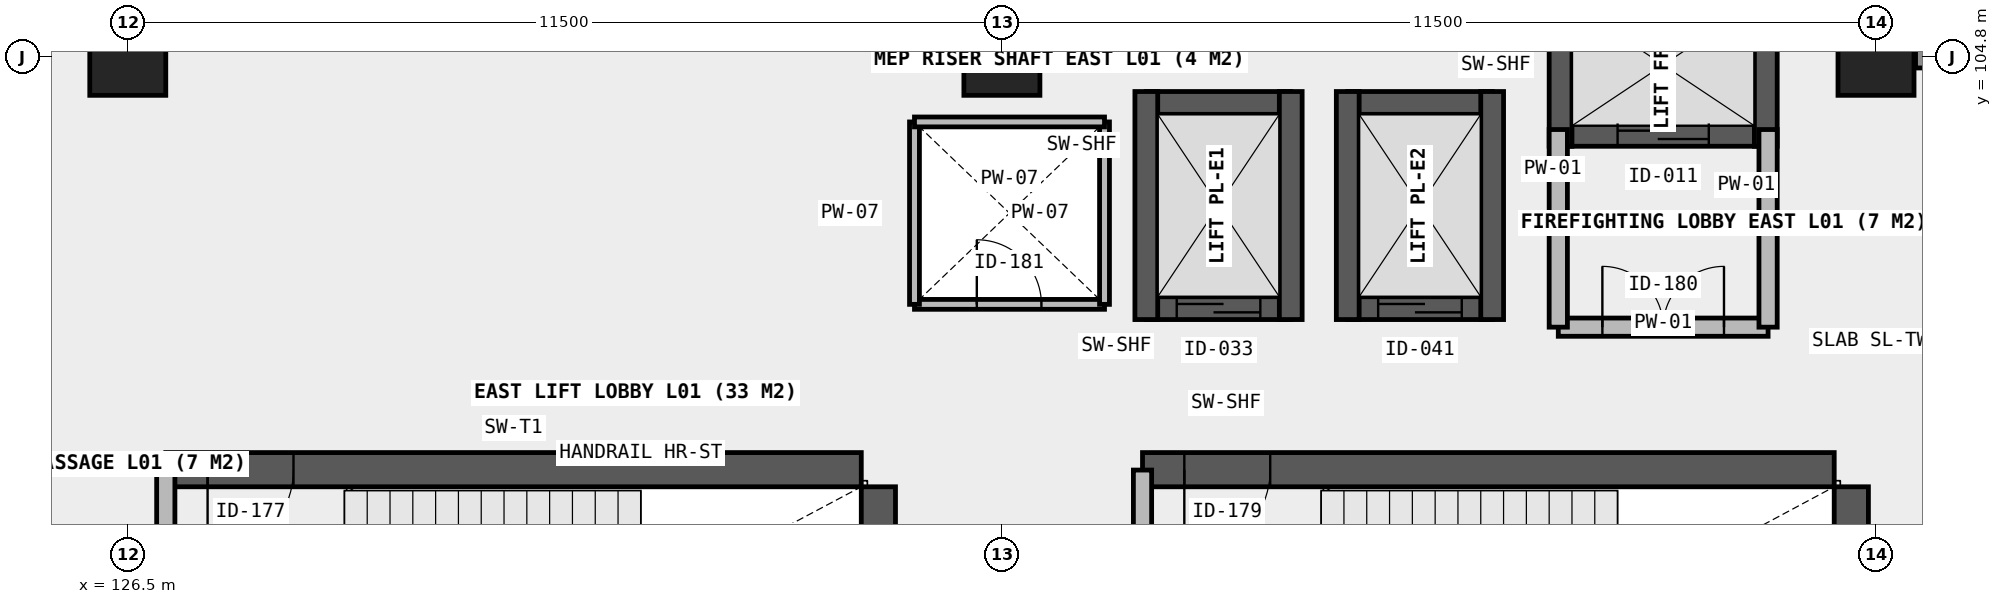
"""IFC4 building model, lengths in metres.
Left out: names, types, materials, properties, quantities, classifications, styles, units other than length and angle.
Written with IfcOpenShell. Run it as: python <this file> out.ifc"""

import sys

from ifc_helpers import new_model, si_unit, direction, frame, frame_2d, origin, origin_2d, place, context, subcontext, project, spatial, rectangle, extrude, element, fill, save


model = new_model("IFC4")
c1 = context("Model", 3, precision=1e-05, world=origin(), true_north=direction((0.0, 1.0)))
c2 = subcontext(c1, "Body", "Model", "MODEL_VIEW")
j1 = project(units=[si_unit("LENGTHUNIT", "METRE"), si_unit("PLANEANGLEUNIT", "RADIAN")], contexts=[c1])
p1 = place(None, origin())
s1 = spatial("IfcSite", under=j1, at=p1, CompositionType="ELEMENT")
p2 = place(p1, origin())
s2 = spatial("IfcBuilding", under=s1, at=p2, CompositionType="ELEMENT")
p3 = place(p2, frame((0.0, 0.0, 4.2)))
s3 = spatial("IfcBuildingStorey", under=s2, at=p3, CompositionType="ELEMENT", Elevation=4.2)
for number, where, z_axis, x_axis in (
    (1, (126.5, 104.8, 0.0), (0.0, 0.0, 1.0), (1.0, 0.0, 0.0)),
    (2, (138.0, 104.8, 0.0), (0.0, 0.0, 1.0), (1.0, 0.0, 0.0)),
    (3, (149.5, 104.8, 0.0), (0.0, 0.0, 1.0), (1.0, 0.0, 0.0)),
):
    element("IfcColumn", number, at=place(p3, frame(where, z_axis=z_axis, x_axis=x_axis)), inside=s3, PredefinedType="COLUMN", context=c2, shape_type="SweptSolid", body=[
        extrude(rectangle(XDim=1.0, YDim=1.0, at=origin_2d()), origin(), (0.0, 0.0, 1.0), 4.2),
    ])
p4 = place(p3, frame((145.35, 103.78, 0.0), z_axis=(0.0, 0.0, 1.0), x_axis=(1.0, 0.0, 0.0)))
e4 = element("IfcWall", 4, at=p4, inside=s3, PredefinedType="SHEAR", context=c2, shape_type="SweptSolid", body=[
    extrude(rectangle(XDim=2.7, YDim=0.3, at=frame_2d((1.35, 0.0))), origin(), (0.0, 0.0, 1.0), 4.2),
])
p5 = place(p4, frame((0.75, 0.0, 0.0)))
e5 = element("IfcOpeningElement", 5, at=p5, cuts=e4, PredefinedType="OPENING", context=c2, shape_type="SweptSolid", body=[
    extrude(rectangle(XDim=1.2, YDim=2.15, at=frame_2d((0.6, 1.075))), frame((0.0, 0.16, 0.0), z_axis=(0.0, -1.0, 0.0), x_axis=(1.0, 0.0, 0.0)), (0.0, 0.0, 1.0), 0.32),
])
for number, where, z_axis, x_axis in (
    (6, (145.35, 103.63, 0.0), (0.0, 0.0, 1.0), (0.0, 1.0, 0.0)),
    (7, (148.05, 103.63, 0.0), (0.0, 0.0, 1.0), (0.0, 1.0, 0.0)),
):
    element("IfcWall", number, at=place(p3, frame(where, z_axis=z_axis, x_axis=x_axis)), inside=s3, PredefinedType="SHEAR", context=c2, shape_type="SweptSolid", body=[
        extrude(rectangle(XDim=2.14, YDim=0.3, at=frame_2d((1.07, 0.0))), origin(), (0.0, 0.0, 1.0), 4.2),
    ])
p6 = place(p3, frame((139.9, 101.5, 0.0), z_axis=(0.0, 0.0, 1.0), x_axis=(1.0, 0.0, 0.0)))
e8 = element("IfcWall", 8, at=p6, inside=s3, PredefinedType="SHEAR", context=c2, shape_type="SweptSolid", body=[
    extrude(rectangle(XDim=1.9, YDim=0.3, at=frame_2d((0.95, 0.0))), origin(), (0.0, 0.0, 1.0), 4.2),
])
p7 = place(p6, frame((0.4, 0.0, 0.0)))
e9 = element("IfcOpeningElement", 9, at=p7, cuts=e8, PredefinedType="OPENING", context=c2, shape_type="SweptSolid", body=[
    extrude(rectangle(XDim=1.1, YDim=2.15, at=frame_2d((0.55, 1.075))), frame((0.0, 0.16, 0.0), z_axis=(0.0, -1.0, 0.0), x_axis=(1.0, 0.0, 0.0)), (0.0, 0.0, 1.0), 0.32),
])
p8 = place(p3, frame((139.9, 104.2, 0.0), z_axis=(0.0, 0.0, 1.0), x_axis=(1.0, 0.0, 0.0)))
e10 = element("IfcWall", 10, at=p8, inside=s3, PredefinedType="SHEAR", context=c2, shape_type="SweptSolid", body=[
    extrude(rectangle(XDim=1.9, YDim=0.3, at=frame_2d((0.95, 0.0))), origin(), (0.0, 0.0, 1.0), 4.2),
])
for number, where, z_axis, x_axis in (
    (11, (139.9, 101.35, 0.0), (0.0, 0.0, 1.0), (0.0, 1.0, 0.0)),
    (12, (141.8, 101.35, 0.0), (0.0, 0.0, 1.0), (0.0, 1.0, 0.0)),
):
    element("IfcWall", number, at=place(p3, frame(where, z_axis=z_axis, x_axis=x_axis)), inside=s3, PredefinedType="SHEAR", context=c2, shape_type="SweptSolid", body=[
        extrude(rectangle(XDim=3.0, YDim=0.3, at=frame_2d((1.5, 0.0))), origin(), (0.0, 0.0, 1.0), 4.2),
    ])
p9 = place(p3, frame((142.55, 101.5, 0.0), z_axis=(0.0, 0.0, 1.0), x_axis=(1.0, 0.0, 0.0)))
e13 = element("IfcWall", 13, at=p9, inside=s3, PredefinedType="SHEAR", context=c2, shape_type="SweptSolid", body=[
    extrude(rectangle(XDim=1.9, YDim=0.3, at=frame_2d((0.95, 0.0))), origin(), (0.0, 0.0, 1.0), 4.2),
])
p10 = place(p9, frame((0.4, 0.0, 0.0)))
e14 = element("IfcOpeningElement", 14, at=p10, cuts=e13, PredefinedType="OPENING", context=c2, shape_type="SweptSolid", body=[
    extrude(rectangle(XDim=1.1, YDim=2.15, at=frame_2d((0.55, 1.075))), frame((0.0, 0.16, 0.0), z_axis=(0.0, -1.0, 0.0), x_axis=(1.0, 0.0, 0.0)), (0.0, 0.0, 1.0), 0.32),
])
p11 = place(p3, frame((142.55, 104.2, 0.0), z_axis=(0.0, 0.0, 1.0), x_axis=(1.0, 0.0, 0.0)))
e15 = element("IfcWall", 15, at=p11, inside=s3, PredefinedType="SHEAR", context=c2, shape_type="SweptSolid", body=[
    extrude(rectangle(XDim=1.9, YDim=0.3, at=frame_2d((0.95, 0.0))), origin(), (0.0, 0.0, 1.0), 4.2),
])
for number, where, z_axis, x_axis in (
    (16, (142.55, 101.35, 0.0), (0.0, 0.0, 1.0), (0.0, 1.0, 0.0)),
    (17, (144.45, 101.35, 0.0), (0.0, 0.0, 1.0), (0.0, 1.0, 0.0)),
):
    element("IfcWall", number, at=place(p3, frame(where, z_axis=z_axis, x_axis=x_axis)), inside=s3, PredefinedType="SHEAR", context=c2, shape_type="SweptSolid", body=[
        extrude(rectangle(XDim=3.0, YDim=0.3, at=frame_2d((1.5, 0.0))), origin(), (0.0, 0.0, 1.0), 4.2),
    ])
p12 = place(p3, frame((127.0, 99.375, 0.0), z_axis=(0.0, 0.0, 1.0), x_axis=(1.0, 0.0, 0.0)))
e18 = element("IfcWall", 18, at=p12, inside=s3, PredefinedType="SHEAR", context=c2, shape_type="SweptSolid", body=[
    extrude(rectangle(XDim=9.15, YDim=0.45, at=frame_2d((4.575, 0.0))), origin(), (0.0, 0.0, 1.0), 4.2),
])
p13 = place(p12, frame((0.55, 0.0, 0.0)))
e19 = element("IfcOpeningElement", 19, at=p13, cuts=e18, PredefinedType="OPENING", context=c2, shape_type="SweptSolid", body=[
    extrude(rectangle(XDim=1.13, YDim=2.15, at=frame_2d((0.565, 1.075))), frame((0.0, 0.235, 0.0), z_axis=(0.0, -1.0, 0.0), x_axis=(1.0, 0.0, 0.0)), (0.0, 0.0, 1.0), 0.47),
])
p14 = place(p3, frame((136.375, 95.55, 0.0), z_axis=(0.0, 0.0, 1.0), x_axis=(0.0, 1.0, 0.0)))
e20 = element("IfcWall", 20, at=p14, inside=s3, PredefinedType="SHEAR", context=c2, shape_type="SweptSolid", body=[
    extrude(rectangle(XDim=3.6, YDim=0.45, at=frame_2d((1.8, 0.0))), origin(), (0.0, 0.0, 1.0), 4.2),
])
p15 = place(p3, frame((139.85, 99.375, 0.0), z_axis=(0.0, 0.0, 1.0), x_axis=(1.0, 0.0, 0.0)))
e21 = element("IfcWall", 21, at=p15, inside=s3, PredefinedType="SHEAR", context=c2, shape_type="SweptSolid", body=[
    extrude(rectangle(XDim=9.1, YDim=0.45, at=frame_2d((4.55, 0.0))), origin(), (0.0, 0.0, 1.0), 4.2),
])
p16 = place(p15, frame((0.55, 0.0, 0.0)))
e22 = element("IfcOpeningElement", 22, at=p16, cuts=e21, PredefinedType="OPENING", context=c2, shape_type="SweptSolid", body=[
    extrude(rectangle(XDim=1.13, YDim=2.15, at=frame_2d((0.565, 1.075))), frame((0.0, 0.235, 0.0), z_axis=(0.0, -1.0, 0.0), x_axis=(1.0, 0.0, 0.0)), (0.0, 0.0, 1.0), 0.47),
])
p17 = place(p3, frame((149.175, 95.32, 0.0), z_axis=(0.0, 0.0, 1.0), x_axis=(0.0, 1.0, 0.0)))
e23 = element("IfcWall", 23, at=p17, inside=s3, PredefinedType="SHEAR", context=c2, shape_type="SweptSolid", body=[
    extrude(rectangle(XDim=3.83, YDim=0.45, at=frame_2d((1.915, 0.0))), origin(), (0.0, 0.0, 1.0), 4.2),
])
p18 = place(p3, frame((150.02, 104.8, 0.0), z_axis=(0.0, 0.0, 1.0), x_axis=(1.0, 0.0, 0.0)))
e24 = element("IfcWall", 24, at=p18, inside=s3, PredefinedType="SOLIDWALL", context=c2, shape_type="SweptSolid", body=[
    extrude(rectangle(XDim=10.46, YDim=0.28, at=frame_2d((5.23, 0.0))), origin(), (0.0, 0.0, 1.0), 3.15),
])
p19 = place(p18, frame((2.22, 0.0, 1.25)))
e25 = element("IfcOpeningElement", 25, at=p19, cuts=e24, PredefinedType="OPENING", context=c2, shape_type="SweptSolid", body=[
    extrude(rectangle(XDim=1.9, YDim=1.25, at=frame_2d((0.95, 0.625))), frame((0.0, 0.15, 0.0), z_axis=(0.0, -1.0, 0.0), x_axis=(1.0, 0.0, 0.0)), (0.0, 0.0, 1.0), 0.3),
])
p20 = place(p18, frame((6.34, 0.0, 1.25)))
e26 = element("IfcOpeningElement", 26, at=p20, cuts=e24, PredefinedType="OPENING", context=c2, shape_type="SweptSolid", body=[
    extrude(rectangle(XDim=1.9, YDim=1.25, at=frame_2d((0.95, 0.625))), frame((0.0, 0.15, 0.0), z_axis=(0.0, -1.0, 0.0), x_axis=(1.0, 0.0, 0.0)), (0.0, 0.0, 1.0), 0.3),
])
p21 = place(p3, frame((127.0, 95.33, 0.0), z_axis=(0.0, 0.0, 1.0), x_axis=(0.0, 1.0, 0.0)))
e27 = element("IfcWall", 27, at=p21, inside=s3, PredefinedType="SOLIDWALL", context=c2, shape_type="SweptSolid", body=[
    extrude(rectangle(XDim=4.04, YDim=0.24, at=frame_2d((2.02, 0.0))), origin(), (0.0, 0.0, 1.0), 3.84),
])
p22 = place(p21, frame((1.45, 0.0, 0.0)))
e28 = element("IfcOpeningElement", 28, at=p22, cuts=e27, PredefinedType="OPENING", context=c2, shape_type="SweptSolid", body=[
    extrude(rectangle(XDim=1.13, YDim=2.15, at=frame_2d((0.565, 1.075))), frame((0.0, 0.13, 0.0), z_axis=(0.0, -1.0, 0.0), x_axis=(1.0, 0.0, 0.0)), (0.0, 0.0, 1.0), 0.26),
])
p23 = place(p3, frame((139.85, 95.33, 0.0), z_axis=(0.0, 0.0, 1.0), x_axis=(0.0, 1.0, 0.0)))
e29 = element("IfcWall", 29, at=p23, inside=s3, PredefinedType="SOLIDWALL", context=c2, shape_type="SweptSolid", body=[
    extrude(rectangle(XDim=4.04, YDim=0.24, at=frame_2d((2.02, 0.0))), origin(), (0.0, 0.0, 1.0), 3.84),
])
p24 = place(p23, frame((1.45, 0.0, 0.0)))
e30 = element("IfcOpeningElement", 30, at=p24, cuts=e29, PredefinedType="OPENING", context=c2, shape_type="SweptSolid", body=[
    extrude(rectangle(XDim=1.13, YDim=2.15, at=frame_2d((0.565, 1.075))), frame((0.0, 0.13, 0.0), z_axis=(0.0, -1.0, 0.0), x_axis=(1.0, 0.0, 0.0)), (0.0, 0.0, 1.0), 0.26),
])
p25 = place(p3, frame((145.32, 101.25, 0.0), z_axis=(0.0, 0.0, 1.0), x_axis=(1.0, 0.0, 0.0)))
e31 = element("IfcWall", 31, at=p25, inside=s3, PredefinedType="SOLIDWALL", context=c2, shape_type="SweptSolid", body=[
    extrude(rectangle(XDim=2.76, YDim=0.24, at=frame_2d((1.38, 0.0))), origin(), (0.0, 0.0, 1.0), 3.84),
])
p26 = place(p25, frame((0.58, 0.0, 0.0)))
e32 = element("IfcOpeningElement", 32, at=p26, cuts=e31, PredefinedType="OPENING", context=c2, shape_type="SweptSolid", body=[
    extrude(rectangle(XDim=1.6, YDim=2.15, at=frame_2d((0.8, 1.075))), frame((0.0, 0.13, 0.0), z_axis=(0.0, -1.0, 0.0), x_axis=(1.0, 0.0, 0.0)), (0.0, 0.0, 1.0), 0.26),
])
for number, where, z_axis, x_axis in (
    (33, (145.32, 101.25, 0.0), (0.0, 0.0, 1.0), (0.0, 1.0, 0.0)),
    (34, (148.08, 101.25, 0.0), (0.0, 0.0, 1.0), (0.0, 1.0, 0.0)),
):
    element("IfcWall", number, at=place(p3, frame(where, z_axis=z_axis, x_axis=x_axis)), inside=s3, PredefinedType="SOLIDWALL", context=c2, shape_type="SweptSolid", body=[
        extrude(rectangle(XDim=2.6, YDim=0.24, at=frame_2d((1.3, 0.0))), origin(), (0.0, 0.0, 1.0), 3.84),
    ])
p27 = place(p3, frame((136.85, 101.55, 0.0), z_axis=(0.0, 0.0, 1.0), x_axis=(1.0, 0.0, 0.0)))
e35 = element("IfcWall", 35, at=p27, inside=s3, PredefinedType="PLUMBINGWALL", context=c2, shape_type="SweptSolid", body=[
    extrude(rectangle(XDim=2.5, YDim=0.13, at=frame_2d((1.25, 0.0))), origin(), (0.0, 0.0, 1.0), 3.84),
])
p28 = place(p27, frame((0.82, 0.0, 0.0)))
e36 = element("IfcOpeningElement", 36, at=p28, cuts=e35, PredefinedType="OPENING", context=c2, shape_type="SweptSolid", body=[
    extrude(rectangle(XDim=0.85, YDim=2.0, at=frame_2d((0.425, 1.0))), frame((0.0, 0.075, 0.0), z_axis=(0.0, -1.0, 0.0), x_axis=(1.0, 0.0, 0.0)), (0.0, 0.0, 1.0), 0.15),
])
for number, where, z_axis, x_axis in (
    (37, (136.85, 101.55, 0.0), (0.0, 0.0, 1.0), (0.0, 1.0, 0.0)),
    (38, (139.35, 101.55, 0.0), (0.0, 0.0, 1.0), (0.0, 1.0, 0.0)),
):
    element("IfcWall", number, at=place(p3, frame(where, z_axis=z_axis, x_axis=x_axis)), inside=s3, PredefinedType="PLUMBINGWALL", context=c2, shape_type="SweptSolid", body=[
        extrude(rectangle(XDim=2.4, YDim=0.13, at=frame_2d((1.2, 0.0))), origin(), (0.0, 0.0, 1.0), 3.84),
    ])
p29 = place(p3, frame((136.85, 103.95, 0.0), z_axis=(0.0, 0.0, 1.0), x_axis=(1.0, 0.0, 0.0)))
e39 = element("IfcWall", 39, at=p29, inside=s3, PredefinedType="PLUMBINGWALL", context=c2, shape_type="SweptSolid", body=[
    extrude(rectangle(XDim=2.5, YDim=0.13, at=frame_2d((1.25, 0.0))), origin(), (0.0, 0.0, 1.0), 3.84),
])
p30 = place(p5, origin())
e40 = element("IfcDoor", 40, at=p30, inside=s3, OperationType="SLIDING_TO_RIGHT", PredefinedType="DOOR", context=c2, shape_type="SweptSolid", body=[
    extrude(rectangle(XDim=1.2, YDim=2.15, at=frame_2d((0.6, 1.075))), frame((0.0, 0.025, 0.0), z_axis=(0.0, -1.0, 0.0), x_axis=(1.0, 0.0, 0.0)), (0.0, 0.0, 1.0), 0.05),
])
fill(e5, e40)
p31 = place(p7, origin())
e41 = element("IfcDoor", 41, at=p31, inside=s3, OperationType="SLIDING_TO_LEFT", PredefinedType="DOOR", context=c2, shape_type="SweptSolid", body=[
    extrude(rectangle(XDim=1.1, YDim=2.15, at=frame_2d((0.55, 1.075))), frame((0.0, 0.025, 0.0), z_axis=(0.0, -1.0, 0.0), x_axis=(1.0, 0.0, 0.0)), (0.0, 0.0, 1.0), 0.05),
])
fill(e9, e41)
p32 = place(p10, origin())
e42 = element("IfcDoor", 42, at=p32, inside=s3, OperationType="SLIDING_TO_LEFT", PredefinedType="DOOR", context=c2, shape_type="SweptSolid", body=[
    extrude(rectangle(XDim=1.1, YDim=2.15, at=frame_2d((0.55, 1.075))), frame((0.0, 0.025, 0.0), z_axis=(0.0, -1.0, 0.0), x_axis=(1.0, 0.0, 0.0)), (0.0, 0.0, 1.0), 0.05),
])
fill(e14, e42)
p33 = place(p13, frame((0.565, 0.0, 0.0), z_axis=(0.0, 0.0, 1.0), x_axis=(-1.0, 0.0, 0.0)))
e43 = element("IfcDoor", 43, at=p33, inside=s3, OperationType="SINGLE_SWING_LEFT", PredefinedType="DOOR", context=c2, shape_type="SweptSolid", body=[
    extrude(rectangle(XDim=1.13, YDim=2.15, at=frame_2d((0.0, 1.075))), frame((0.0, 0.025, 0.0), z_axis=(0.0, -1.0, 0.0), x_axis=(1.0, 0.0, 0.0)), (0.0, 0.0, 1.0), 0.05),
])
fill(e19, e43)
p34 = place(p16, frame((0.565, 0.0, 0.0), z_axis=(0.0, 0.0, 1.0), x_axis=(-1.0, 0.0, 0.0)))
e44 = element("IfcDoor", 44, at=p34, inside=s3, OperationType="SINGLE_SWING_LEFT", PredefinedType="DOOR", context=c2, shape_type="SweptSolid", body=[
    extrude(rectangle(XDim=1.13, YDim=2.15, at=frame_2d((0.0, 1.075))), frame((0.0, 0.025, 0.0), z_axis=(0.0, -1.0, 0.0), x_axis=(1.0, 0.0, 0.0)), (0.0, 0.0, 1.0), 0.05),
])
fill(e22, e44)
p35 = place(p26, origin())
e45 = element("IfcDoor", 45, at=p35, inside=s3, OperationType="DOUBLE_DOOR_SINGLE_SWING", PredefinedType="DOOR", context=c2, shape_type="SweptSolid", body=[
    extrude(rectangle(XDim=1.6, YDim=2.15, at=frame_2d((0.8, 1.075))), frame((0.0, 0.025, 0.0), z_axis=(0.0, -1.0, 0.0), x_axis=(1.0, 0.0, 0.0)), (0.0, 0.0, 1.0), 0.05),
])
fill(e32, e45)
p36 = place(p28, origin())
e46 = element("IfcDoor", 46, at=p36, inside=s3, OperationType="SINGLE_SWING_LEFT", PredefinedType="TRAPDOOR", context=c2, shape_type="SweptSolid", body=[
    extrude(rectangle(XDim=0.85, YDim=2.0, at=frame_2d((0.425, 1.0))), frame((0.0, 0.025, 0.0), z_axis=(0.0, -1.0, 0.0), x_axis=(1.0, 0.0, 0.0)), (0.0, 0.0, 1.0), 0.05),
])
fill(e36, e46)
save(model, sys.argv[1])
